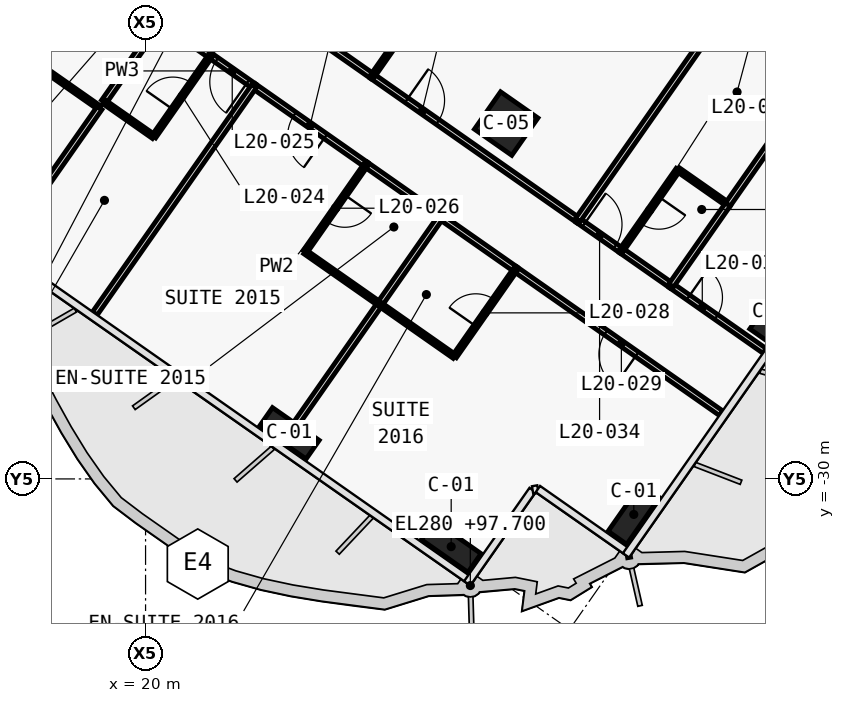
"""IFC4 building model, lengths in metres.
Left out: names, types, materials, properties, quantities, classifications, styles, units other than length and angle.
Written with IfcOpenShell. Run it as: python <this file> out.ifc"""

import sys

from ifc_helpers import new_model, si_unit, direction, frame, frame_2d, origin, origin_2d, place, context, subcontext, project, spatial, rectangle, extrude, element, fill, save


model = new_model("IFC4")
c1 = context("Model", 3, precision=1e-05, world=origin(), true_north=direction((0.0, 1.0)))
c2 = subcontext(c1, "Body", "Model", "MODEL_VIEW")
j1 = project(units=[si_unit("LENGTHUNIT", "METRE"), si_unit("PLANEANGLEUNIT", "RADIAN")], contexts=[c1])
p1 = place(None, origin())
s1 = spatial("IfcSite", under=j1, at=p1, CompositionType="ELEMENT")
p2 = place(p1, origin())
s2 = spatial("IfcBuilding", under=s1, at=p2, CompositionType="ELEMENT")
p3 = place(p2, frame((0.0, 0.0, 97.7)))
s3 = spatial("IfcBuildingStorey", under=s2, at=p3, CompositionType="ELEMENT", Elevation=97.7)
for number, where, z_axis, x_axis in (
    (1, (23.782, -28.799, 0.0), (0.0, 0.0, 1.0), (0.819, -0.574, 0.0)),
    (2, (28.042, -31.782, 0.0), (0.0, 0.0, 1.0), (0.819, -0.574, 0.0)),
    (3, (32.847, -30.935, 0.0), (0.0, 0.0, 1.0), (0.574, 0.819, 0.0)),
    (4, (36.575, -25.61, 0.0), (0.0, 0.0, 1.0), (0.574, 0.819, 0.0)),
):
    element("IfcColumn", number, at=place(p3, frame(where, z_axis=z_axis, x_axis=x_axis)), inside=s3, PredefinedType="COLUMN", context=c2, shape_type="SweptSolid", body=[
        extrude(rectangle(XDim=1.5, YDim=0.6, at=origin_2d()), origin(), (0.0, 0.0, 1.0), 3.6),
    ])
p4 = place(p3, frame((29.49, -20.649, 0.0), z_axis=(0.0, 0.0, 1.0), x_axis=(0.819152044289, -0.573576436351, 0.0)))
e5 = element("IfcColumn", 5, at=p4, inside=s3, PredefinedType="COLUMN", context=c2, shape_type="SweptSolid", body=[
    extrude(rectangle(XDim=1.2, YDim=1.2, at=origin_2d()), origin(), (0.0, 0.0, 1.0), 3.6),
])
p5 = place(p3, frame((25.966, -19.403, 0.0), z_axis=(0.0, 0.0, 1.0), x_axis=(0.819171118839, -0.573549194106, 0.0)))
e6 = element("IfcWall", 6, at=p5, inside=s3, PredefinedType="PARTITIONING", context=c2, shape_type="SweptSolid", body=[
    extrude(rectangle(XDim=6.603, YDim=0.15, at=frame_2d((3.302, 0.0))), origin(), (0.0, 0.0, 1.0), 2.6),
])
p6 = place(p5, frame((1.101, 0.0, 0.0)))
e7 = element("IfcOpeningElement", 7, at=p6, cuts=e6, PredefinedType="OPENING", context=c2, shape_type="SweptSolid", body=[
    extrude(rectangle(XDim=1.0, YDim=2.1, at=frame_2d((0.5, 1.05))), frame((0.0, 0.085, 0.0), z_axis=(0.0, -1.0, 0.0), x_axis=(1.0, 0.0, 0.0)), (0.0, 0.0, 1.0), 0.17),
])
p7 = place(p3, frame((23.999, -18.025, 0.0), z_axis=(0.0, 0.0, 1.0), x_axis=(0.819146032251, -0.573585022335, 0.0)))
e8 = element("IfcWall", 8, at=p7, inside=s3, PredefinedType="PARTITIONING", context=c2, shape_type="SweptSolid", body=[
    extrude(rectangle(XDim=2.404, YDim=0.15, at=frame_2d((1.202, 0.0))), origin(), (0.0, 0.0, 1.0), 3.32),
])
p8 = place(p3, frame((31.372, -23.188, 0.0), z_axis=(0.0, 0.0, 1.0), x_axis=(0.819199220913, -0.573509055252, 0.0)))
e9 = element("IfcWall", 9, at=p8, inside=s3, PredefinedType="PARTITIONING", context=c2, shape_type="SweptSolid", body=[
    extrude(rectangle(XDim=1.403, YDim=0.15, at=frame_2d((0.702, 0.0))), origin(), (0.0, 0.0, 1.0), 3.32),
])
p9 = place(p8, frame((0.202, 0.0, 0.0)))
e10 = element("IfcOpeningElement", 10, at=p9, cuts=e9, PredefinedType="OPENING", context=c2, shape_type="SweptSolid", body=[
    extrude(rectangle(XDim=1.0, YDim=2.1, at=frame_2d((0.5, 1.05))), frame((0.0, 0.085, 0.0), z_axis=(0.0, -1.0, 0.0), x_axis=(1.0, 0.0, 0.0)), (0.0, 0.0, 1.0), 0.17),
])
p10 = place(p3, frame((32.519, -23.99, 0.0), z_axis=(0.0, 0.0, 1.0), x_axis=(0.819189013667, -0.573523634986, 0.0)))
e11 = element("IfcWall", 11, at=p10, inside=s3, PredefinedType="PARTITIONING", context=c2, shape_type="SweptSolid", body=[
    extrude(rectangle(XDim=1.604, YDim=0.15, at=frame_2d((0.802, 0.0))), origin(), (0.0, 0.0, 1.0), 3.32),
])
p11 = place(p3, frame((33.829, -24.908, 0.0), z_axis=(0.0, 0.0, 1.0), x_axis=(0.81915932427, -0.57356603932, 0.0)))
e12 = element("IfcWall", 12, at=p11, inside=s3, PredefinedType="PARTITIONING", context=c2, shape_type="SweptSolid", body=[
    extrude(rectangle(XDim=3.002, YDim=0.15, at=frame_2d((1.501, 0.0))), origin(), (0.0, 0.0, 1.0), 2.5),
])
p12 = place(p11, frame((0.551, 0.0, 0.0)))
e13 = element("IfcOpeningElement", 13, at=p12, cuts=e12, PredefinedType="OPENING", context=c2, shape_type="SweptSolid", body=[
    extrude(rectangle(XDim=0.9, YDim=2.1, at=frame_2d((0.45, 1.05))), frame((0.0, 0.085, 0.0), z_axis=(0.0, -1.0, 0.0), x_axis=(1.0, 0.0, 0.0)), (0.0, 0.0, 1.0), 0.17),
])
p13 = place(p3, frame((22.855, -19.666, 0.0), z_axis=(0.0, 0.0, 1.0), x_axis=(-0.819060210533, 0.573707566205, 0.0)))
e14 = element("IfcWall", 14, at=p13, inside=s3, PredefinedType="PARTITIONING", context=c2, shape_type="SweptSolid", body=[
    extrude(rectangle(XDim=1.403, YDim=0.15, at=frame_2d((0.702, 0.0))), origin(), (0.0, 0.0, 1.0), 3.32),
])
p14 = place(p13, frame((0.202, 0.0, 0.0)))
e15 = element("IfcOpeningElement", 15, at=p14, cuts=e14, PredefinedType="OPENING", context=c2, shape_type="SweptSolid", body=[
    extrude(rectangle(XDim=1.0, YDim=2.1, at=frame_2d((0.5, 1.05))), frame((0.0, 0.085, 0.0), z_axis=(0.0, -1.0, 0.0), x_axis=(1.0, 0.0, 0.0)), (0.0, 0.0, 1.0), 0.17),
])
p15 = place(p3, frame((21.709, -18.863, 0.0), z_axis=(0.0, 0.0, 1.0), x_axis=(-0.819189013667, 0.573523634986, 0.0)))
e16 = element("IfcWall", 16, at=p15, inside=s3, PredefinedType="PARTITIONING", context=c2, shape_type="SweptSolid", body=[
    extrude(rectangle(XDim=1.604, YDim=0.15, at=frame_2d((0.802, 0.0))), origin(), (0.0, 0.0, 1.0), 2.6),
])
p16 = place(p3, frame((25.804, -21.73, 0.0), z_axis=(0.0, 0.0, 1.0), x_axis=(-0.819145961204, 0.573585123798, 0.0)))
e17 = element("IfcWall", 17, at=p16, inside=s3, PredefinedType="PARTITIONING", context=c2, shape_type="SweptSolid", body=[
    extrude(rectangle(XDim=3.603, YDim=0.15, at=frame_2d((1.802, 0.0))), origin(), (0.0, 0.0, 1.0), 3.32),
])
p17 = place(p16, frame((1.301, 0.0, 0.0)))
e18 = element("IfcOpeningElement", 18, at=p17, cuts=e17, PredefinedType="OPENING", context=c2, shape_type="SweptSolid", body=[
    extrude(rectangle(XDim=1.0, YDim=2.1, at=frame_2d((0.5, 1.05))), frame((0.0, 0.085, 0.0), z_axis=(0.0, -1.0, 0.0), x_axis=(1.0, 0.0, 0.0)), (0.0, 0.0, 1.0), 0.17),
])
p18 = place(p3, frame((27.771, -23.107, 0.0), z_axis=(0.0, 0.0, 1.0), x_axis=(-0.819179439794, 0.573537309527, 0.0)))
e19 = element("IfcWall", 19, at=p18, inside=s3, PredefinedType="PARTITIONING", context=c2, shape_type="SweptSolid", body=[
    extrude(rectangle(XDim=2.404, YDim=0.15, at=frame_2d((1.202, 0.0))), origin(), (0.0, 0.0, 1.0), 2.6),
])
p19 = place(p3, frame((35.141, -28.268, 0.0), z_axis=(0.0, 0.0, 1.0), x_axis=(-0.819155459934, 0.573571558274, 0.0)))
e20 = element("IfcWall", 20, at=p19, inside=s3, PredefinedType="PARTITIONING", context=c2, shape_type="SweptSolid", body=[
    extrude(rectangle(XDim=6.601, YDim=0.15, at=frame_2d((3.301, 0.0))), origin(), (0.0, 0.0, 1.0), 2.5),
])
p20 = place(p19, frame((2.7, 0.0, 0.0)))
e21 = element("IfcOpeningElement", 21, at=p20, cuts=e20, PredefinedType="OPENING", context=c2, shape_type="SweptSolid", body=[
    extrude(rectangle(XDim=1.0, YDim=2.1, at=frame_2d((0.5, 1.05))), frame((0.0, 0.085, 0.0), z_axis=(0.0, -1.0, 0.0), x_axis=(1.0, 0.0, 0.0)), (0.0, 0.0, 1.0), 0.17),
])
p21 = place(p3, frame((29.736, -24.484, 0.0), z_axis=(0.0, 0.0, 1.0), x_axis=(-0.819146032251, 0.573585022335, 0.0)))
e22 = element("IfcWall", 22, at=p21, inside=s3, PredefinedType="PARTITIONING", context=c2, shape_type="SweptSolid", body=[
    extrude(rectangle(XDim=2.404, YDim=0.15, at=frame_2d((1.202, 0.0))), origin(), (0.0, 0.0, 1.0), 2.6),
])
p22 = place(p3, frame((25.968, -19.404, 0.0), z_axis=(0.0, 0.0, 1.0), x_axis=(0.573591086599, 0.819141785879, 0.0)))
e23 = element("IfcWall", 23, at=p22, inside=s3, PredefinedType="PARTITIONING", context=c2, shape_type="SweptSolid", body=[
    extrude(rectangle(XDim=2.8, YDim=0.12, at=frame_2d((1.4, 0.0))), origin(), (0.0, 0.0, 1.0), 2.6),
])
p23 = place(p22, frame((0.975, 0.0, 0.0)))
e24 = element("IfcOpeningElement", 24, at=p23, cuts=e23, PredefinedType="OPENING", context=c2, shape_type="SweptSolid", body=[
    extrude(rectangle(XDim=0.85, YDim=2.05, at=frame_2d((0.425, 1.025))), frame((0.0, 0.07, 0.0), z_axis=(0.0, -1.0, 0.0), x_axis=(1.0, 0.0, 0.0)), (0.0, 0.0, 1.0), 0.14),
])
p24 = place(p3, frame((37.855, -13.932, 0.0), z_axis=(0.0, 0.0, 1.0), x_axis=(-0.573571089604, -0.819155788095, 0.0)))
e25 = element("IfcWall", 25, at=p24, inside=s3, PredefinedType="PARTITIONING", context=c2, shape_type="SweptSolid", body=[
    extrude(rectangle(XDim=11.3, YDim=0.15, at=frame_2d((5.65, 0.0))), origin(), (0.0, 0.0, 1.0), 2.5),
])
p25 = place(p3, frame((35.323, -22.779, 0.0), z_axis=(0.0, 0.0, 1.0), x_axis=(-0.81918174131, 0.573534022273, 0.0)))
e26 = element("IfcWall", 26, at=p25, inside=s3, PredefinedType="PARTITIONING", context=c2, shape_type="SweptSolid", body=[
    extrude(rectangle(XDim=1.6, YDim=0.12, at=frame_2d((0.8, 0.0))), origin(), (0.0, 0.0, 1.0), 3.32),
])
p26 = place(p3, frame((34.01, -21.861, 0.0), z_axis=(0.0, 0.0, 1.0), x_axis=(-0.573537965655, -0.819178980414, 0.0)))
e27 = element("IfcWall", 27, at=p26, inside=s3, PredefinedType="PARTITIONING", context=c2, shape_type="SweptSolid", body=[
    extrude(rectangle(XDim=2.6, YDim=0.12, at=frame_2d((1.3, 0.0))), origin(), (0.0, 0.0, 1.0), 2.6),
])
p27 = place(p26, frame((0.875, 0.0, 0.0)))
e28 = element("IfcOpeningElement", 28, at=p27, cuts=e27, PredefinedType="OPENING", context=c2, shape_type="SweptSolid", body=[
    extrude(rectangle(XDim=0.85, YDim=2.05, at=frame_2d((0.425, 1.025))), frame((0.0, 0.07, 0.0), z_axis=(0.0, -1.0, 0.0), x_axis=(1.0, 0.0, 0.0)), (0.0, 0.0, 1.0), 0.14),
])
p28 = place(p3, frame((38.708, -17.945, 0.0), z_axis=(0.0, 0.0, 1.0), x_axis=(-0.573573403315, -0.819154168035, 0.0)))
e29 = element("IfcWall", 29, at=p28, inside=s3, PredefinedType="PARTITIONING", context=c2, shape_type="SweptSolid", body=[
    extrude(rectangle(XDim=5.901, YDim=0.15, at=frame_2d((2.951, 0.0))), origin(), (0.0, 0.0, 1.0), 3.32),
])
p29 = place(p3, frame((35.322, -22.78, 0.0), z_axis=(0.0, 0.0, 1.0), x_axis=(-0.573537965655, -0.819178980414, 0.0)))
e30 = element("IfcWall", 30, at=p29, inside=s3, PredefinedType="PARTITIONING", context=c2, shape_type="SweptSolid", body=[
    extrude(rectangle(XDim=2.6, YDim=0.15, at=frame_2d((1.3, 0.0))), origin(), (0.0, 0.0, 1.0), 2.6),
])
p30 = place(p3, frame((18.43, -16.567, 0.0), z_axis=(0.0, 0.0, 1.0), x_axis=(-0.573608623498, -0.819129505664, 0.0)))
e31 = element("IfcWall", 31, at=p30, inside=s3, PredefinedType="PARTITIONING", context=c2, shape_type="SweptSolid", body=[
    extrude(rectangle(XDim=2.8, YDim=0.12, at=frame_2d((1.4, 0.0))), origin(), (0.0, 0.0, 1.0), 3.32),
])
p31 = place(p30, frame((0.975, 0.0, 0.0)))
e32 = element("IfcOpeningElement", 32, at=p31, cuts=e31, PredefinedType="OPENING", context=c2, shape_type="SweptSolid", body=[
    extrude(rectangle(XDim=0.85, YDim=2.05, at=frame_2d((0.425, 1.025))), frame((0.0, 0.07, 0.0), z_axis=(0.0, -1.0, 0.0), x_axis=(1.0, 0.0, 0.0)), (0.0, 0.0, 1.0), 0.14),
])
p32 = place(p3, frame((16.824, -18.862, 0.0), z_axis=(0.0, 0.0, 1.0), x_axis=(0.819141114317, -0.573592045652, 0.0)))
e33 = element("IfcWall", 33, at=p32, inside=s3, PredefinedType="PARTITIONING", context=c2, shape_type="SweptSolid", body=[
    extrude(rectangle(XDim=2.4, YDim=0.12, at=frame_2d((1.2, 0.0))), origin(), (0.0, 0.0, 1.0), 2.6),
])
p33 = place(p3, frame((18.79, -20.239, 0.0), z_axis=(0.0, 0.0, 1.0), x_axis=(-0.573594994199, -0.819139049631, 0.0)))
e34 = element("IfcWall", 34, at=p33, inside=s3, PredefinedType="PARTITIONING", context=c2, shape_type="SweptSolid", body=[
    extrude(rectangle(XDim=3.829, YDim=0.15, at=frame_2d((1.915, 0.0))), origin(), (0.0, 0.0, 1.0), 2.6),
])
p34 = place(p3, frame((20.396, -17.944, 0.0), z_axis=(0.0, 0.0, 1.0), x_axis=(-0.573651240222, -0.819099660964, 0.0)))
e35 = element("IfcWall", 35, at=p34, inside=s3, PredefinedType="PARTITIONING", context=c2, shape_type="SweptSolid", body=[
    extrude(rectangle(XDim=2.602, YDim=0.15, at=frame_2d((1.301, 0.0))), origin(), (0.0, 0.0, 1.0), 2.6),
])
p35 = place(p3, frame((18.905, -20.075, 0.0), z_axis=(0.0, 0.0, 1.0), x_axis=(0.819131543282, -0.57360571371, 0.0)))
e36 = element("IfcWall", 36, at=p35, inside=s3, PredefinedType="PARTITIONING", context=c2, shape_type="SweptSolid", body=[
    extrude(rectangle(XDim=1.6, YDim=0.12, at=frame_2d((0.8, 0.0))), origin(), (0.0, 0.0, 1.0), 2.6),
])
p36 = place(p3, frame((20.217, -20.992, 0.0), z_axis=(0.0, 0.0, 1.0), x_axis=(0.573537965655, 0.819178980414, 0.0)))
e37 = element("IfcWall", 37, at=p36, inside=s3, PredefinedType="PARTITIONING", context=c2, shape_type="SweptSolid", body=[
    extrude(rectangle(XDim=2.6, YDim=0.12, at=frame_2d((1.3, 0.0))), origin(), (0.0, 0.0, 1.0), 3.32),
])
p37 = place(p36, frame((0.875, 0.0, 0.0)))
e38 = element("IfcOpeningElement", 38, at=p37, cuts=e37, PredefinedType="OPENING", context=c2, shape_type="SweptSolid", body=[
    extrude(rectangle(XDim=0.85, YDim=2.05, at=frame_2d((0.425, 1.025))), frame((0.0, 0.07, 0.0), z_axis=(0.0, -1.0, 0.0), x_axis=(1.0, 0.0, 0.0)), (0.0, 0.0, 1.0), 0.14),
])
p38 = place(p3, frame((22.854, -19.665, 0.0), z_axis=(0.0, 0.0, 1.0), x_axis=(-0.573572324301, -0.819154923562, 0.0)))
e39 = element("IfcWall", 39, at=p38, inside=s3, PredefinedType="PARTITIONING", context=c2, shape_type="SweptSolid", body=[
    extrude(rectangle(XDim=7.3, YDim=0.15, at=frame_2d((3.65, 0.0))), origin(), (0.0, 0.0, 1.0), 2.5),
])
p39 = place(p3, frame((25.802, -21.729, 0.0), z_axis=(0.0, 0.0, 1.0), x_axis=(-0.573608623498, -0.819129505664, 0.0)))
e40 = element("IfcWall", 40, at=p39, inside=s3, PredefinedType="PARTITIONING", context=c2, shape_type="SweptSolid", body=[
    extrude(rectangle(XDim=2.8, YDim=0.12, at=frame_2d((1.4, 0.0))), origin(), (0.0, 0.0, 1.0), 3.32),
])
p40 = place(p39, frame((0.975, 0.0, 0.0)))
e41 = element("IfcOpeningElement", 41, at=p40, cuts=e40, PredefinedType="OPENING", context=c2, shape_type="SweptSolid", body=[
    extrude(rectangle(XDim=0.85, YDim=2.05, at=frame_2d((0.425, 1.025))), frame((0.0, 0.07, 0.0), z_axis=(0.0, -1.0, 0.0), x_axis=(1.0, 0.0, 0.0)), (0.0, 0.0, 1.0), 0.14),
])
p41 = place(p3, frame((24.196, -24.024, 0.0), z_axis=(0.0, 0.0, 1.0), x_axis=(0.819155442668, -0.573571582932, 0.0)))
e42 = element("IfcWall", 42, at=p41, inside=s3, PredefinedType="PARTITIONING", context=c2, shape_type="SweptSolid", body=[
    extrude(rectangle(XDim=2.4, YDim=0.12, at=frame_2d((1.2, 0.0))), origin(), (0.0, 0.0, 1.0), 2.6),
])
p42 = place(p3, frame((26.162, -25.401, 0.0), z_axis=(0.0, 0.0, 1.0), x_axis=(-0.573594994199, -0.819139049631, 0.0)))
e43 = element("IfcWall", 43, at=p42, inside=s3, PredefinedType="PARTITIONING", context=c2, shape_type="SweptSolid", body=[
    extrude(rectangle(XDim=3.829, YDim=0.15, at=frame_2d((1.915, 0.0))), origin(), (0.0, 0.0, 1.0), 2.6),
])
p43 = place(p3, frame((27.769, -23.106, 0.0), z_axis=(0.0, 0.0, 1.0), x_axis=(-0.573608623498, -0.819129505664, 0.0)))
e44 = element("IfcWall", 44, at=p43, inside=s3, PredefinedType="PARTITIONING", context=c2, shape_type="SweptSolid", body=[
    extrude(rectangle(XDim=2.8, YDim=0.15, at=frame_2d((1.4, 0.0))), origin(), (0.0, 0.0, 1.0), 2.6),
])
p44 = place(p3, frame((26.162, -25.401, 0.0), z_axis=(0.0, 0.0, 1.0), x_axis=(0.819188907105, -0.573523787192, 0.0)))
e45 = element("IfcWall", 45, at=p44, inside=s3, PredefinedType="PARTITIONING", context=c2, shape_type="SweptSolid", body=[
    extrude(rectangle(XDim=2.4, YDim=0.12, at=frame_2d((1.2, 0.0))), origin(), (0.0, 0.0, 1.0), 2.6),
])
p45 = place(p3, frame((28.129, -26.777, 0.0), z_axis=(0.0, 0.0, 1.0), x_axis=(0.573608623498, 0.819129505664, 0.0)))
e46 = element("IfcWall", 46, at=p45, inside=s3, PredefinedType="PARTITIONING", context=c2, shape_type="SweptSolid", body=[
    extrude(rectangle(XDim=2.8, YDim=0.12, at=frame_2d((1.4, 0.0))), origin(), (0.0, 0.0, 1.0), 3.32),
])
p46 = place(p45, frame((0.975, 0.0, 0.0)))
e47 = element("IfcOpeningElement", 47, at=p46, cuts=e46, PredefinedType="OPENING", context=c2, shape_type="SweptSolid", body=[
    extrude(rectangle(XDim=0.85, YDim=2.05, at=frame_2d((0.425, 1.025))), frame((0.0, 0.07, 0.0), z_axis=(0.0, -1.0, 0.0), x_axis=(1.0, 0.0, 0.0)), (0.0, 0.0, 1.0), 0.14),
])
p47 = place(p37, origin())
e48 = element("IfcDoor", 48, at=p47, inside=s3, OperationType="SINGLE_SWING_LEFT", PredefinedType="DOOR", context=c2, shape_type="SweptSolid", body=[
    extrude(rectangle(XDim=0.85, YDim=2.05, at=frame_2d((0.425, 1.025))), frame((0.0, 0.025, 0.0), z_axis=(0.0, -1.0, 0.0), x_axis=(1.0, 0.0, 0.0)), (0.0, 0.0, 1.0), 0.05),
])
fill(e38, e48)
p48 = place(p14, origin())
e49 = element("IfcDoor", 49, at=p48, inside=s3, OperationType="SINGLE_SWING_RIGHT", PredefinedType="DOOR", context=c2, shape_type="SweptSolid", body=[
    extrude(rectangle(XDim=1.0, YDim=2.1, at=frame_2d((0.5, 1.05))), frame((0.0, 0.025, 0.0), z_axis=(0.0, -1.0, 0.0), x_axis=(1.0, 0.0, 0.0)), (0.0, 0.0, 1.0), 0.05),
])
fill(e15, e49)
p49 = place(p40, origin())
e50 = element("IfcDoor", 50, at=p49, inside=s3, OperationType="SINGLE_SWING_RIGHT", PredefinedType="DOOR", context=c2, shape_type="SweptSolid", body=[
    extrude(rectangle(XDim=0.85, YDim=2.05, at=frame_2d((0.425, 1.025))), frame((0.0, 0.025, 0.0), z_axis=(0.0, -1.0, 0.0), x_axis=(1.0, 0.0, 0.0)), (0.0, 0.0, 1.0), 0.05),
])
fill(e41, e50)
p50 = place(p17, origin())
e51 = element("IfcDoor", 51, at=p50, inside=s3, OperationType="SINGLE_SWING_LEFT", PredefinedType="DOOR", context=c2, shape_type="SweptSolid", body=[
    extrude(rectangle(XDim=1.0, YDim=2.1, at=frame_2d((0.5, 1.05))), frame((0.0, 0.025, 0.0), z_axis=(0.0, -1.0, 0.0), x_axis=(1.0, 0.0, 0.0)), (0.0, 0.0, 1.0), 0.05),
])
fill(e18, e51)
p51 = place(p46, origin())
e52 = element("IfcDoor", 52, at=p51, inside=s3, OperationType="SINGLE_SWING_RIGHT", PredefinedType="DOOR", context=c2, shape_type="SweptSolid", body=[
    extrude(rectangle(XDim=0.85, YDim=2.05, at=frame_2d((0.425, 1.025))), frame((0.0, 0.025, 0.0), z_axis=(0.0, -1.0, 0.0), x_axis=(1.0, 0.0, 0.0)), (0.0, 0.0, 1.0), 0.05),
])
fill(e47, e52)
p52 = place(p20, origin())
e53 = element("IfcDoor", 53, at=p52, inside=s3, OperationType="SINGLE_SWING_LEFT", PredefinedType="DOOR", context=c2, shape_type="SweptSolid", body=[
    extrude(rectangle(XDim=1.0, YDim=2.1, at=frame_2d((0.5, 1.05))), frame((0.0, 0.025, 0.0), z_axis=(0.0, -1.0, 0.0), x_axis=(1.0, 0.0, 0.0)), (0.0, 0.0, 1.0), 0.05),
])
fill(e21, e53)
p53 = place(p6, origin())
e54 = element("IfcDoor", 54, at=p53, inside=s3, OperationType="SINGLE_SWING_RIGHT", PredefinedType="DOOR", context=c2, shape_type="SweptSolid", body=[
    extrude(rectangle(XDim=1.0, YDim=2.1, at=frame_2d((0.5, 1.05))), frame((0.0, 0.025, 0.0), z_axis=(0.0, -1.0, 0.0), x_axis=(1.0, 0.0, 0.0)), (0.0, 0.0, 1.0), 0.05),
])
fill(e7, e54)
p54 = place(p27, origin())
e55 = element("IfcDoor", 55, at=p54, inside=s3, OperationType="SINGLE_SWING_RIGHT", PredefinedType="DOOR", context=c2, shape_type="SweptSolid", body=[
    extrude(rectangle(XDim=0.85, YDim=2.05, at=frame_2d((0.425, 1.025))), frame((0.0, 0.025, 0.0), z_axis=(0.0, -1.0, 0.0), x_axis=(1.0, 0.0, 0.0)), (0.0, 0.0, 1.0), 0.05),
])
fill(e28, e55)
p55 = place(p9, origin())
e56 = element("IfcDoor", 56, at=p55, inside=s3, OperationType="SINGLE_SWING_LEFT", PredefinedType="DOOR", context=c2, shape_type="SweptSolid", body=[
    extrude(rectangle(XDim=1.0, YDim=2.1, at=frame_2d((0.5, 1.05))), frame((0.0, 0.025, 0.0), z_axis=(0.0, -1.0, 0.0), x_axis=(1.0, 0.0, 0.0)), (0.0, 0.0, 1.0), 0.05),
])
fill(e10, e56)
p56 = place(p12, origin())
e57 = element("IfcDoor", 57, at=p56, inside=s3, OperationType="SINGLE_SWING_LEFT", PredefinedType="DOOR", context=c2, shape_type="SweptSolid", body=[
    extrude(rectangle(XDim=0.9, YDim=2.1, at=frame_2d((0.45, 1.05))), frame((0.0, 0.025, 0.0), z_axis=(0.0, -1.0, 0.0), x_axis=(1.0, 0.0, 0.0)), (0.0, 0.0, 1.0), 0.05),
])
fill(e13, e57)
save(model, sys.argv[1])
